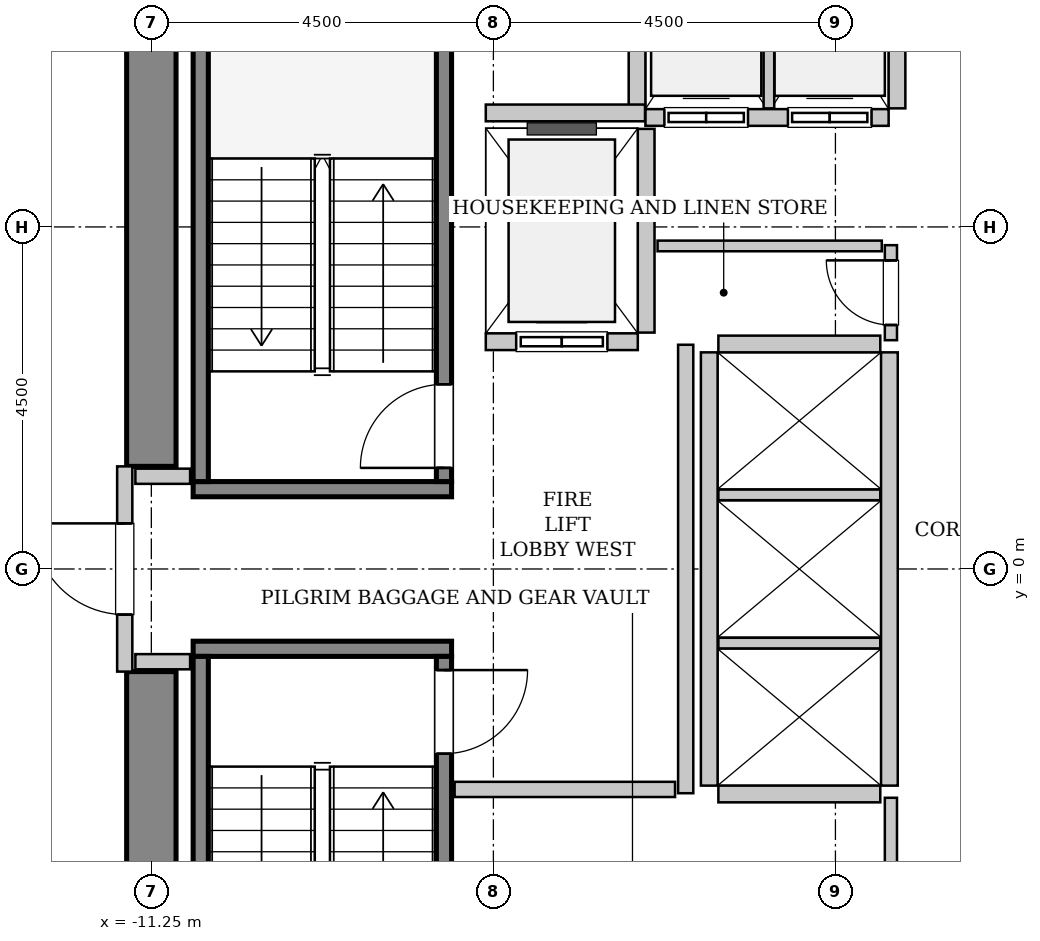
"""IFC4 building model, lengths in metres.
Left out: names, types, materials, properties, quantities, classifications, styles, units other than length and angle.
Written with IfcOpenShell. Run it as: python <this file> out.ifc"""

import sys

from ifc_helpers import new_model, si_unit, direction, frame, frame_2d, origin, place, context, subcontext, project, spatial, rectangle, extrude, source, transform, mapped, element, fill, save


model = new_model("IFC4")
c1 = context("Model", 3, precision=1e-05, world=origin(), true_north=direction((0.0, 1.0)))
c2 = subcontext(c1, "Body", "Model", "MODEL_VIEW")
j1 = project(units=[si_unit("LENGTHUNIT", "METRE"), si_unit("PLANEANGLEUNIT", "RADIAN")], contexts=[c1])
p1 = place(None, origin())
s1 = spatial("IfcSite", under=j1, at=p1, CompositionType="ELEMENT")
p2 = place(p1, origin())
s2 = spatial("IfcBuilding", under=s1, at=p2, CompositionType="ELEMENT")
p3 = place(p2, frame((0.0, 0.0, 82.4)))
s3 = spatial("IfcBuildingStorey", under=s2, at=p3, CompositionType="ELEMENT", Elevation=82.4)
m1 = source(origin(), c2, "Body", "SweptSolid", [
    extrude(rectangle(XDim=7.325, YDim=0.65, at=frame_2d((3.663, 0.0))), origin(), (0.0, 0.0, 1.0), 3.8),
])
for number, where, z_axis, x_axis in (
    (1, (-11.25, -8.675, 0.0), (0.0, 0.0, 1.0), (0.0, 1.0, 0.0)),
    (2, (-11.25, 1.35, 0.0), (0.0, 0.0, 1.0), (0.0, 1.0, 0.0)),
):
    element("IfcWall", number, at=place(p3, frame(where, z_axis=z_axis, x_axis=x_axis)), inside=s3, PredefinedType="SHEAR", context=c2, shape_type="MappedRepresentation", body=[
        mapped(m1, transform((0.0, 0.0, 0.0), x_axis=(1.0, 0.0, 0.0), y_axis=(0.0, 1.0, 0.0), z_axis=(0.0, 0.0, 1.0), scale=1.0)),
    ])
m2 = source(origin(), c2, "Body", "SweptSolid", [
    extrude(rectangle(XDim=3.4, YDim=0.2, at=frame_2d((1.7, 0.0))), origin(), (0.0, 0.0, 1.0), 3.8),
])
p4 = place(p3, frame((-7.3, 1.05, 0.0), z_axis=(0.0, 0.0, 1.0), x_axis=(-1.0, 0.0, 0.0)))
e3 = element("IfcWall", 3, at=p4, inside=s3, PredefinedType="SOLIDWALL", context=c2, shape_type="MappedRepresentation", body=[
    mapped(m2, transform((0.0, 0.0, 0.0), x_axis=(1.0, 0.0, 0.0), y_axis=(0.0, 1.0, 0.0), z_axis=(0.0, 0.0, 1.0), scale=1.0)),
])
m3 = source(origin(), c2, "Body", "SweptSolid", [
    extrude(rectangle(XDim=7.1, YDim=0.2, at=frame_2d((3.55, 0.0))), origin(), (0.0, 0.0, 1.0), 3.8),
])
p5 = place(p3, frame((-7.4, 1.15, 0.0), z_axis=(0.0, 0.0, 1.0), x_axis=(0.0, 1.0, 0.0)))
e4 = element("IfcWall", 4, at=p5, inside=s3, PredefinedType="SOLIDWALL", context=c2, shape_type="MappedRepresentation", body=[
    mapped(m3, transform((0.0, 0.0, 0.0), x_axis=(1.0, 0.0, 0.0), y_axis=(0.0, 1.0, 0.0), z_axis=(0.0, 0.0, 1.0), scale=1.0)),
])
p6 = place(p5, frame((0.18, 0.0, 0.0)))
e5 = element("IfcOpeningElement", 5, at=p6, cuts=e4, PredefinedType="OPENING", context=c2, shape_type="SweptSolid", body=[
    extrude(rectangle(XDim=1.1, YDim=2.15, at=frame_2d((0.55, 1.075))), frame((0.0, 0.11, 0.0), z_axis=(0.0, -1.0, 0.0), x_axis=(1.0, 0.0, 0.0)), (0.0, 0.0, 1.0), 0.22),
])
p7 = place(p3, frame((-10.6, 1.15, 0.0), z_axis=(0.0, 0.0, 1.0), x_axis=(0.0, 1.0, 0.0)))
e6 = element("IfcWall", 6, at=p7, inside=s3, PredefinedType="SOLIDWALL", context=c2, shape_type="MappedRepresentation", body=[
    mapped(m3, transform((0.0, 0.0, 0.0), x_axis=(1.0, 0.0, 0.0), y_axis=(0.0, 1.0, 0.0), z_axis=(0.0, 0.0, 1.0), scale=1.0)),
])
p8 = place(p3, frame((-10.7, -1.05, 0.0), z_axis=(0.0, 0.0, 1.0), x_axis=(1.0, 0.0, 0.0)))
e7 = element("IfcWall", 7, at=p8, inside=s3, PredefinedType="SOLIDWALL", context=c2, shape_type="MappedRepresentation", body=[
    mapped(m2, transform((0.0, 0.0, 0.0), x_axis=(1.0, 0.0, 0.0), y_axis=(0.0, 1.0, 0.0), z_axis=(0.0, 0.0, 1.0), scale=1.0)),
])
p9 = place(p3, frame((-10.6, -1.15, 0.0), z_axis=(0.0, 0.0, 1.0), x_axis=(0.0, -1.0, 0.0)))
e8 = element("IfcWall", 8, at=p9, inside=s3, PredefinedType="SOLIDWALL", context=c2, shape_type="MappedRepresentation", body=[
    mapped(m3, transform((0.0, 0.0, 0.0), x_axis=(1.0, 0.0, 0.0), y_axis=(0.0, 1.0, 0.0), z_axis=(0.0, 0.0, 1.0), scale=1.0)),
])
p10 = place(p3, frame((-7.4, -1.15, 0.0), z_axis=(0.0, 0.0, 1.0), x_axis=(0.0, -1.0, 0.0)))
e9 = element("IfcWall", 9, at=p10, inside=s3, PredefinedType="SOLIDWALL", context=c2, shape_type="MappedRepresentation", body=[
    mapped(m3, transform((0.0, 0.0, 0.0), x_axis=(1.0, 0.0, 0.0), y_axis=(0.0, 1.0, 0.0), z_axis=(0.0, 0.0, 1.0), scale=1.0)),
])
p11 = place(p10, frame((0.18, 0.0, 0.0)))
e10 = element("IfcOpeningElement", 10, at=p11, cuts=e9, PredefinedType="OPENING", context=c2, shape_type="SweptSolid", body=[
    extrude(rectangle(XDim=1.1, YDim=2.15, at=frame_2d((0.55, 1.075))), frame((0.0, 0.11, 0.0), z_axis=(0.0, -1.0, 0.0), x_axis=(1.0, 0.0, 0.0)), (0.0, 0.0, 1.0), 0.22),
])
m4 = source(origin(), c2, "Body", "SweptSolid", [
    extrude(rectangle(XDim=2.0, YDim=0.22, at=frame_2d((1.0, 0.0))), origin(), (0.0, 0.0, 1.0), 3.485),
])
p12 = place(p3, frame((-6.85, 2.99, 0.0), z_axis=(0.0, 0.0, 1.0), x_axis=(1.0, 0.0, 0.0)))
e11 = element("IfcWall", 11, at=p12, inside=s3, PredefinedType="SOLIDWALL", context=c2, shape_type="MappedRepresentation", body=[
    mapped(m4, transform((0.0, 0.0, 0.0), x_axis=(1.0, 0.0, 0.0), y_axis=(0.0, 1.0, 0.0), z_axis=(0.0, 0.0, 1.0), scale=1.0)),
])
p13 = place(p12, frame((0.4, 0.0, 0.0)))
e12 = element("IfcOpeningElement", 12, at=p13, cuts=e11, PredefinedType="OPENING", context=c2, shape_type="SweptSolid", body=[
    extrude(rectangle(XDim=1.2, YDim=2.2, at=frame_2d((0.6, 1.1))), frame((0.0, 0.12, 0.0), z_axis=(0.0, -1.0, 0.0), x_axis=(1.0, 0.0, 0.0)), (0.0, 0.0, 1.0), 0.24),
])
m5 = source(origin(), c2, "Body", "SweptSolid", [
    extrude(rectangle(XDim=2.68, YDim=0.22, at=frame_2d((1.34, 0.0))), origin(), (0.0, 0.0, 1.0), 3.485),
])
p14 = place(p3, frame((-4.74, 3.11, 0.0), z_axis=(0.0, 0.0, 1.0), x_axis=(0.0, 1.0, 0.0)))
e13 = element("IfcWall", 13, at=p14, inside=s3, PredefinedType="SOLIDWALL", context=c2, shape_type="MappedRepresentation", body=[
    mapped(m5, transform((0.0, 0.0, 0.0), x_axis=(1.0, 0.0, 0.0), y_axis=(0.0, 1.0, 0.0), z_axis=(0.0, 0.0, 1.0), scale=1.0)),
])
m6 = source(origin(), c2, "Body", "SweptSolid", [
    extrude(rectangle(XDim=3.2, YDim=0.22, at=frame_2d((1.6, 0.0))), origin(), (0.0, 0.0, 1.0), 3.485),
])
p15 = place(p3, frame((-4.75, 5.94, 0.0), z_axis=(0.0, 0.0, 1.0), x_axis=(1.0, 0.0, 0.0)))
e14 = element("IfcWall", 14, at=p15, inside=s3, PredefinedType="SOLIDWALL", context=c2, shape_type="MappedRepresentation", body=[
    mapped(m6, transform((0.0, 0.0, 0.0), x_axis=(1.0, 0.0, 0.0), y_axis=(0.0, 1.0, 0.0), z_axis=(0.0, 0.0, 1.0), scale=1.0)),
])
p16 = place(p15, frame((0.25, 0.0, 0.0)))
e15 = element("IfcOpeningElement", 15, at=p16, cuts=e14, PredefinedType="OPENING", context=c2, shape_type="SweptSolid", body=[
    extrude(rectangle(XDim=1.1, YDim=2.2, at=frame_2d((0.55, 1.1))), frame((0.0, 0.12, 0.0), z_axis=(0.0, -1.0, 0.0), x_axis=(1.0, 0.0, 0.0)), (0.0, 0.0, 1.0), 0.24),
])
p17 = place(p15, frame((1.875, 0.0, 0.0)))
e16 = element("IfcOpeningElement", 16, at=p17, cuts=e14, PredefinedType="OPENING", context=c2, shape_type="SweptSolid", body=[
    extrude(rectangle(XDim=1.1, YDim=2.2, at=frame_2d((0.55, 1.1))), frame((0.0, 0.12, 0.0), z_axis=(0.0, -1.0, 0.0), x_axis=(1.0, 0.0, 0.0)), (0.0, 0.0, 1.0), 0.24),
])
m7 = source(origin(), c2, "Body", "SweptSolid", [
    extrude(rectangle(XDim=2.43, YDim=0.22, at=frame_2d((1.215, 0.0))), origin(), (0.0, 0.0, 1.0), 3.485),
])
p18 = place(p3, frame((-4.86, 8.49, 0.0), z_axis=(0.0, 0.0, 1.0), x_axis=(0.0, -1.0, 0.0)))
e17 = element("IfcWall", 17, at=p18, inside=s3, PredefinedType="SOLIDWALL", context=c2, shape_type="MappedRepresentation", body=[
    mapped(m7, transform((0.0, 0.0, 0.0), x_axis=(1.0, 0.0, 0.0), y_axis=(0.0, 1.0, 0.0), z_axis=(0.0, 0.0, 1.0), scale=1.0)),
])
m8 = source(origin(), c2, "Body", "SweptSolid", [
    extrude(rectangle(XDim=2.43, YDim=0.14, at=frame_2d((1.215, 0.0))), origin(), (0.0, 0.0, 1.0), 3.485),
])
p19 = place(p3, frame((-3.125, 6.06, 0.0), z_axis=(0.0, 0.0, 1.0), x_axis=(0.0, 1.0, 0.0)))
e18 = element("IfcWall", 18, at=p19, inside=s3, PredefinedType="PARTITIONING", context=c2, shape_type="MappedRepresentation", body=[
    mapped(m8, transform((0.0, 0.0, 0.0), x_axis=(1.0, 0.0, 0.0), y_axis=(0.0, 1.0, 0.0), z_axis=(0.0, 0.0, 1.0), scale=1.0)),
])
p20 = place(p3, frame((-1.44, 6.06, 0.0), z_axis=(0.0, 0.0, 1.0), x_axis=(0.0, 1.0, 0.0)))
e19 = element("IfcWall", 19, at=p20, inside=s3, PredefinedType="SOLIDWALL", context=c2, shape_type="MappedRepresentation", body=[
    mapped(m7, transform((0.0, 0.0, 0.0), x_axis=(1.0, 0.0, 0.0), y_axis=(0.0, 1.0, 0.0), z_axis=(0.0, 0.0, 1.0), scale=1.0)),
])
m9 = source(origin(), c2, "Body", "SweptSolid", [
    extrude(rectangle(XDim=5.7, YDim=0.22, at=frame_2d((2.85, 0.0))), origin(), (0.0, 0.0, 1.0), 3.485),
])
for number, where, z_axis, x_axis in (
    (20, (-1.54, -2.85, 0.0), (0.0, 0.0, 1.0), (0.0, 1.0, 0.0)),
    (21, (-3.91, 2.85, 0.0), (0.0, 0.0, 1.0), (0.0, -1.0, 0.0)),
):
    element("IfcWall", number, at=place(p3, frame(where, z_axis=z_axis, x_axis=x_axis)), inside=s3, PredefinedType="SOLIDWALL", context=c2, shape_type="MappedRepresentation", body=[
        mapped(m9, transform((0.0, 0.0, 0.0), x_axis=(1.0, 0.0, 0.0), y_axis=(0.0, 1.0, 0.0), z_axis=(0.0, 0.0, 1.0), scale=1.0)),
    ])
m10 = source(origin(), c2, "Body", "SweptSolid", [
    extrude(rectangle(XDim=2.13, YDim=0.22, at=frame_2d((1.065, 0.0))), origin(), (0.0, 0.0, 1.0), 3.485),
])
p21 = place(p3, frame((-3.79, -2.96, 0.0), z_axis=(0.0, 0.0, 1.0), x_axis=(1.0, 0.0, 0.0)))
e22 = element("IfcWall", 22, at=p21, inside=s3, PredefinedType="SOLIDWALL", context=c2, shape_type="MappedRepresentation", body=[
    mapped(m10, transform((0.0, 0.0, 0.0), x_axis=(1.0, 0.0, 0.0), y_axis=(0.0, 1.0, 0.0), z_axis=(0.0, 0.0, 1.0), scale=1.0)),
])
m11 = source(origin(), c2, "Body", "SweptSolid", [
    extrude(rectangle(XDim=2.13, YDim=0.14, at=frame_2d((1.065, 0.0))), origin(), (0.0, 0.0, 1.0), 3.485),
])
for number, where, z_axis, x_axis in (
    (23, (-3.79, -0.975, 0.0), (0.0, 0.0, 1.0), (1.0, 0.0, 0.0)),
    (24, (-3.79, 0.975, 0.0), (0.0, 0.0, 1.0), (1.0, 0.0, 0.0)),
):
    element("IfcWall", number, at=place(p3, frame(where, z_axis=z_axis, x_axis=x_axis)), inside=s3, PredefinedType="PARTITIONING", context=c2, shape_type="MappedRepresentation", body=[
        mapped(m11, transform((0.0, 0.0, 0.0), x_axis=(1.0, 0.0, 0.0), y_axis=(0.0, 1.0, 0.0), z_axis=(0.0, 0.0, 1.0), scale=1.0)),
    ])
p22 = place(p3, frame((-1.66, 2.96, 0.0), z_axis=(0.0, 0.0, 1.0), x_axis=(-1.0, 0.0, 0.0)))
e25 = element("IfcWall", 25, at=p22, inside=s3, PredefinedType="SOLIDWALL", context=c2, shape_type="MappedRepresentation", body=[
    mapped(m10, transform((0.0, 0.0, 0.0), x_axis=(1.0, 0.0, 0.0), y_axis=(0.0, 1.0, 0.0), z_axis=(0.0, 0.0, 1.0), scale=1.0)),
])
m12 = source(origin(), c2, "Body", "SweptSolid", [
    extrude(rectangle(XDim=2.095, YDim=0.22, at=frame_2d((1.048, 0.0))), origin(), (0.0, 0.0, 1.0), 3.485),
])
p23 = place(p3, frame((-6.85, 6.0, 0.0), z_axis=(0.0, 0.0, 1.0), x_axis=(1.0, 0.0, 0.0)))
e26 = element("IfcWall", 26, at=p23, inside=s3, PredefinedType="SOLIDWALL", context=c2, shape_type="MappedRepresentation", body=[
    mapped(m12, transform((0.0, 0.0, 0.0), x_axis=(1.0, 0.0, 0.0), y_axis=(0.0, 1.0, 0.0), z_axis=(0.0, 0.0, 1.0), scale=1.0)),
])
m13 = source(origin(), c2, "Body", "SweptSolid", [
    extrude(rectangle(XDim=2.7, YDim=0.2, at=frame_2d((1.35, 0.0))), origin(), (0.0, 0.0, 1.0), 2.375),
])
p24 = place(p3, frame((-11.6, -1.35, 0.0), z_axis=(0.0, 0.0, 1.0), x_axis=(0.0, 1.0, 0.0)))
e27 = element("IfcWall", 27, at=p24, inside=s3, PredefinedType="PARTITIONING", context=c2, shape_type="MappedRepresentation", body=[
    mapped(m13, transform((0.0, 0.0, 0.0), x_axis=(1.0, 0.0, 0.0), y_axis=(0.0, 1.0, 0.0), z_axis=(0.0, 0.0, 1.0), scale=1.0)),
])
p25 = place(p24, frame((0.75, 0.0, 0.0)))
e28 = element("IfcOpeningElement", 28, at=p25, cuts=e27, PredefinedType="OPENING", context=c2, shape_type="SweptSolid", body=[
    extrude(rectangle(XDim=1.2, YDim=2.15, at=frame_2d((0.6, 1.075))), frame((0.0, 0.11, 0.0), z_axis=(0.0, -1.0, 0.0), x_axis=(1.0, 0.0, 0.0)), (0.0, 0.0, 1.0), 0.22),
])
m14 = source(origin(), c2, "Body", "SweptSolid", [
    extrude(rectangle(XDim=5.9, YDim=0.2, at=frame_2d((2.95, 0.0))), origin(), (0.0, 0.0, 1.0), 3.485),
])
p26 = place(p3, frame((-4.22, -2.95, 0.0), z_axis=(0.0, 0.0, 1.0), x_axis=(0.0, 1.0, 0.0)))
e29 = element("IfcWall", 29, at=p26, inside=s3, PredefinedType="PARTITIONING", context=c2, shape_type="MappedRepresentation", body=[
    mapped(m14, transform((0.0, 0.0, 0.0), x_axis=(1.0, 0.0, 0.0), y_axis=(0.0, 1.0, 0.0), z_axis=(0.0, 0.0, 1.0), scale=1.0)),
])
m15 = source(origin(), c2, "Body", "SweptSolid", [
    extrude(rectangle(XDim=2.9, YDim=0.2, at=frame_2d((1.45, 0.0))), origin(), (0.0, 0.0, 1.0), 3.485),
])
p27 = place(p3, frame((-7.26, -2.9, 0.0), z_axis=(0.0, 0.0, 1.0), x_axis=(1.0, 0.0, 0.0)))
e30 = element("IfcWall", 30, at=p27, inside=s3, PredefinedType="PARTITIONING", context=c2, shape_type="MappedRepresentation", body=[
    mapped(m15, transform((0.0, 0.0, 0.0), x_axis=(1.0, 0.0, 0.0), y_axis=(0.0, 1.0, 0.0), z_axis=(0.0, 0.0, 1.0), scale=1.0)),
])
m16 = source(origin(), c2, "Body", "SweptSolid", [
    extrude(rectangle(XDim=0.72, YDim=0.2, at=frame_2d((0.36, 0.0))), origin(), (0.0, 0.0, 1.0), 3.485),
])
for number, where, z_axis, x_axis in (
    (31, (-11.46, 1.22, 0.0), (0.0, 0.0, 1.0), (1.0, 0.0, 0.0)),
    (32, (-11.46, -1.22, 0.0), (0.0, 0.0, 1.0), (1.0, 0.0, 0.0)),
):
    element("IfcWall", number, at=place(p3, frame(where, z_axis=z_axis, x_axis=x_axis)), inside=s3, PredefinedType="PARTITIONING", context=c2, shape_type="MappedRepresentation", body=[
        mapped(m16, transform((0.0, 0.0, 0.0), x_axis=(1.0, 0.0, 0.0), y_axis=(0.0, 1.0, 0.0), z_axis=(0.0, 0.0, 1.0), scale=1.0)),
    ])
m17 = source(origin(), c2, "Body", "SweptSolid", [
    extrude(rectangle(XDim=1.25, YDim=0.16, at=frame_2d((0.625, 0.0))), origin(), (0.0, 0.0, 1.0), 3.485),
])
p28 = place(p3, frame((-1.52, 3.01, 0.0), z_axis=(0.0, 0.0, 1.0), x_axis=(0.0, 1.0, 0.0)))
e33 = element("IfcWall", 33, at=p28, inside=s3, PredefinedType="PARTITIONING", context=c2, shape_type="MappedRepresentation", body=[
    mapped(m17, transform((0.0, 0.0, 0.0), x_axis=(1.0, 0.0, 0.0), y_axis=(0.0, 1.0, 0.0), z_axis=(0.0, 0.0, 1.0), scale=1.0)),
])
p29 = place(p28, frame((0.2, 0.0, 0.0)))
e34 = element("IfcOpeningElement", 34, at=p29, cuts=e33, PredefinedType="OPENING", context=c2, shape_type="SweptSolid", body=[
    extrude(rectangle(XDim=0.85, YDim=2.1, at=frame_2d((0.425, 1.05))), frame((0.0, 0.09, 0.0), z_axis=(0.0, -1.0, 0.0), x_axis=(1.0, 0.0, 0.0)), (0.0, 0.0, 1.0), 0.18),
])
m18 = source(origin(), c2, "Body", "SweptSolid", [
    extrude(rectangle(XDim=2.95, YDim=0.14, at=frame_2d((1.475, 0.0))), origin(), (0.0, 0.0, 1.0), 3.485),
])
p30 = place(p3, frame((-4.59, 4.25, 0.0), z_axis=(0.0, 0.0, 1.0), x_axis=(1.0, 0.0, 0.0)))
e35 = element("IfcWall", 35, at=p30, inside=s3, PredefinedType="PARTITIONING", context=c2, shape_type="MappedRepresentation", body=[
    mapped(m18, transform((0.0, 0.0, 0.0), x_axis=(1.0, 0.0, 0.0), y_axis=(0.0, 1.0, 0.0), z_axis=(0.0, 0.0, 1.0), scale=1.0)),
])
m19 = source(origin(), c2, "Body", "SweptSolid", [
    extrude(rectangle(XDim=2.88, YDim=0.16, at=frame_2d((1.44, 0.0))), origin(), (0.0, 0.0, 1.0), 3.485),
])
p31 = place(p3, frame((-1.52, -5.89, 0.0), z_axis=(0.0, 0.0, 1.0), x_axis=(0.0, 1.0, 0.0)))
e36 = element("IfcWall", 36, at=p31, inside=s3, PredefinedType="PARTITIONING", context=c2, shape_type="MappedRepresentation", body=[
    mapped(m19, transform((0.0, 0.0, 0.0), x_axis=(1.0, 0.0, 0.0), y_axis=(0.0, 1.0, 0.0), z_axis=(0.0, 0.0, 1.0), scale=1.0)),
])
p32 = place(p31, frame((1.015, 0.0, 0.0)))
e37 = element("IfcOpeningElement", 37, at=p32, cuts=e36, PredefinedType="OPENING", context=c2, shape_type="SweptSolid", body=[
    extrude(rectangle(XDim=0.85, YDim=2.1, at=frame_2d((0.425, 1.05))), frame((0.0, 0.09, 0.0), z_axis=(0.0, -1.0, 0.0), x_axis=(1.0, 0.0, 0.0)), (0.0, 0.0, 1.0), 0.18),
])
m20 = source(origin(), c2, "Body", "SweptSolid", [
    extrude(rectangle(XDim=1.1, YDim=2.15, at=frame_2d((0.55, 1.075))), frame((0.0, 0.025, 0.0), z_axis=(0.0, -1.0, 0.0), x_axis=(1.0, 0.0, 0.0)), (0.0, 0.0, 1.0), 0.05),
])
p33 = place(p6, origin())
e38 = element("IfcDoor", 38, at=p33, inside=s3, OperationType="SINGLE_SWING_LEFT", PredefinedType="DOOR", context=c2, shape_type="MappedRepresentation", body=[
    mapped(m20, transform((0.0, 0.0, 0.0), x_axis=(1.0, 0.0, 0.0), y_axis=(0.0, 1.0, 0.0), z_axis=(0.0, 0.0, 1.0), scale=1.0)),
])
fill(e5, e38)
p34 = place(p11, origin())
e39 = element("IfcDoor", 39, at=p34, inside=s3, OperationType="SINGLE_SWING_LEFT", PredefinedType="DOOR", context=c2, shape_type="MappedRepresentation", body=[
    mapped(m20, transform((0.0, 0.0, 0.0), x_axis=(1.0, 0.0, 0.0), y_axis=(0.0, 1.0, 0.0), z_axis=(0.0, 0.0, 1.0), scale=1.0)),
])
fill(e10, e39)
m21 = source(origin(), c2, "Body", "SweptSolid", [
    extrude(rectangle(XDim=1.2, YDim=2.2, at=frame_2d((0.6, 1.1))), frame((0.0, 0.025, 0.0), z_axis=(0.0, -1.0, 0.0), x_axis=(1.0, 0.0, 0.0)), (0.0, 0.0, 1.0), 0.05),
])
p35 = place(p13, origin())
e40 = element("IfcDoor", 40, at=p35, inside=s3, OperationType="SLIDING_TO_LEFT", PredefinedType="DOOR", context=c2, shape_type="MappedRepresentation", body=[
    mapped(m21, transform((0.0, 0.0, 0.0), x_axis=(1.0, 0.0, 0.0), y_axis=(0.0, 1.0, 0.0), z_axis=(0.0, 0.0, 1.0), scale=1.0)),
])
fill(e12, e40)
m22 = source(origin(), c2, "Body", "SweptSolid", [
    extrude(rectangle(XDim=1.1, YDim=2.2, at=frame_2d((0.55, 1.1))), frame((0.0, 0.025, 0.0), z_axis=(0.0, -1.0, 0.0), x_axis=(1.0, 0.0, 0.0)), (0.0, 0.0, 1.0), 0.05),
])
p36 = place(p16, origin())
e41 = element("IfcDoor", 41, at=p36, inside=s3, OperationType="DOUBLE_DOOR_SLIDING", PredefinedType="DOOR", context=c2, shape_type="MappedRepresentation", body=[
    mapped(m22, transform((0.0, 0.0, 0.0), x_axis=(1.0, 0.0, 0.0), y_axis=(0.0, 1.0, 0.0), z_axis=(0.0, 0.0, 1.0), scale=1.0)),
])
fill(e15, e41)
p37 = place(p17, origin())
e42 = element("IfcDoor", 42, at=p37, inside=s3, OperationType="DOUBLE_DOOR_SLIDING", PredefinedType="DOOR", context=c2, shape_type="MappedRepresentation", body=[
    mapped(m22, transform((0.0, 0.0, 0.0), x_axis=(1.0, 0.0, 0.0), y_axis=(0.0, 1.0, 0.0), z_axis=(0.0, 0.0, 1.0), scale=1.0)),
])
fill(e16, e42)
m23 = source(origin(), c2, "Body", "SweptSolid", [
    extrude(rectangle(XDim=1.2, YDim=2.15, at=frame_2d((0.6, 1.075))), frame((0.0, 0.025, 0.0), z_axis=(0.0, -1.0, 0.0), x_axis=(1.0, 0.0, 0.0)), (0.0, 0.0, 1.0), 0.05),
])
p38 = place(p25, origin())
e43 = element("IfcDoor", 43, at=p38, inside=s3, OperationType="SINGLE_SWING_RIGHT", PredefinedType="DOOR", context=c2, shape_type="MappedRepresentation", body=[
    mapped(m23, transform((0.0, 0.0, 0.0), x_axis=(1.0, 0.0, 0.0), y_axis=(0.0, 1.0, 0.0), z_axis=(0.0, 0.0, 1.0), scale=1.0)),
])
fill(e28, e43)
m24 = source(origin(), c2, "Body", "SweptSolid", [
    extrude(rectangle(XDim=0.85, YDim=2.1, at=frame_2d((0.425, 1.05))), frame((0.0, 0.025, 0.0), z_axis=(0.0, -1.0, 0.0), x_axis=(1.0, 0.0, 0.0)), (0.0, 0.0, 1.0), 0.05),
])
p39 = place(p29, origin())
e44 = element("IfcDoor", 44, at=p39, inside=s3, OperationType="SINGLE_SWING_RIGHT", PredefinedType="DOOR", context=c2, shape_type="MappedRepresentation", body=[
    mapped(m24, transform((0.0, 0.0, 0.0), x_axis=(1.0, 0.0, 0.0), y_axis=(0.0, 1.0, 0.0), z_axis=(0.0, 0.0, 1.0), scale=1.0)),
])
fill(e34, e44)
save(model, sys.argv[1])
